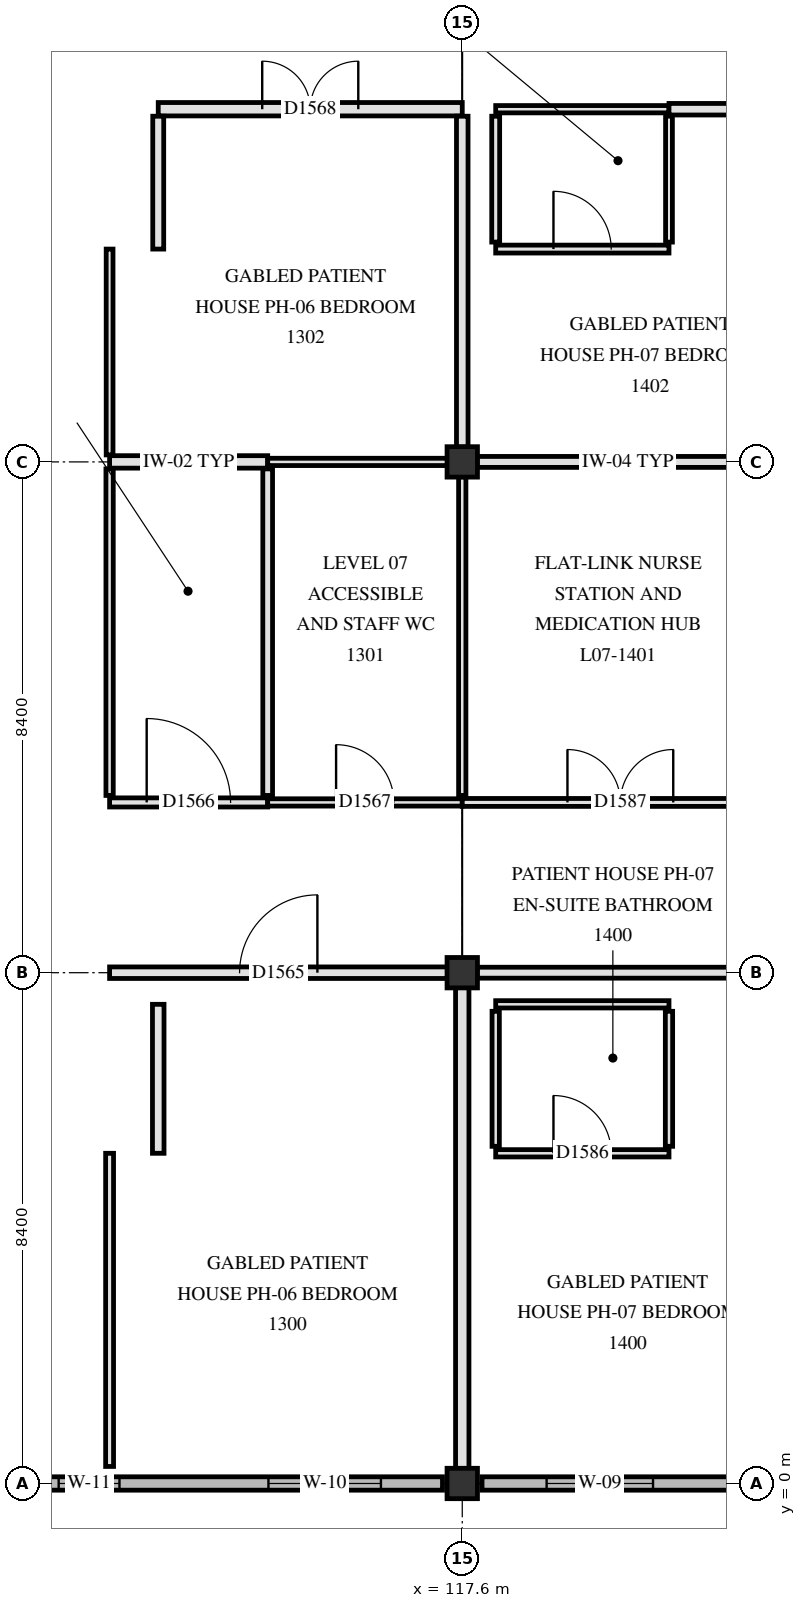
"""IFC4 building model, lengths in metres.
Left out: names, types, materials, properties, quantities, classifications, styles, units other than length and angle.
Written with IfcOpenShell. Run it as: python <this file> out.ifc"""

import sys

from ifc_helpers import new_model, si_unit, direction, frame, frame_2d, origin, origin_2d, place, context, subcontext, project, spatial, polyline, rectangle, outline, extrude, element, fill, save


model = new_model("IFC4")
c1 = context("Model", 3, precision=1e-05, world=origin(), true_north=direction((0.0, 1.0)))
c2 = subcontext(c1, "Body", "Model", "MODEL_VIEW")
j1 = project(units=[si_unit("LENGTHUNIT", "METRE"), si_unit("PLANEANGLEUNIT", "RADIAN")], contexts=[c1])
p1 = place(None, origin())
s1 = spatial("IfcSite", under=j1, at=p1, CompositionType="ELEMENT")
p2 = place(p1, origin())
s2 = spatial("IfcBuilding", under=s1, at=p2, CompositionType="ELEMENT")
p3 = place(p2, frame((0.0, 0.0, 30.3)))
s3 = spatial("IfcBuildingStorey", under=s2, at=p3, CompositionType="ELEMENT", Elevation=30.3)
for number, where, z_axis, x_axis in (
    (1, (117.6, 0.0, 0.0), (0.0, 0.0, 1.0), (1.0, 0.0, 0.0)),
    (2, (117.6, 8.4, 0.0), (0.0, 0.0, 1.0), (1.0, 0.0, 0.0)),
    (3, (117.6, 16.8, 0.0), (0.0, 0.0, 1.0), (1.0, 0.0, 0.0)),
):
    element("IfcColumn", number, at=place(p3, frame(where, z_axis=z_axis, x_axis=x_axis)), inside=s3, PredefinedType="COLUMN", context=c2, shape_type="SweptSolid", body=[
        extrude(rectangle(XDim=0.5, YDim=0.5, at=origin_2d()), origin(), (0.0, 0.0, 1.0), 3.9),
    ])
p4 = place(p3, frame((125.675, 0.0, 0.0), z_axis=(0.0, 0.0, 1.0), x_axis=(-1.0, 0.0, 0.0)))
e4 = element("IfcWall", 4, at=p4, inside=s3, PredefinedType="SOLIDWALL", context=c2, shape_type="SweptSolid", body=[
    extrude(outline(polyline([(0.0, 0.0), (7.75, 0.0), (7.75, 3.4), (3.875, 5.76), (0.0, 3.4), (0.0, 0.0)])), frame((0.0, 0.11, 0.0), z_axis=(0.0, -1.0, 0.0), x_axis=(1.0, 0.0, 0.0)), (0.0, 0.0, 1.0), 0.22),
])
p5 = place(p4, frame((1.113, 0.0, 0.85)))
e5 = element("IfcOpeningElement", 5, at=p5, cuts=e4, PredefinedType="OPENING", context=c2, shape_type="SweptSolid", body=[
    extrude(rectangle(XDim=1.65, YDim=1.3, at=frame_2d((0.825, 0.65))), frame((0.0, 0.12, 0.0), z_axis=(0.0, -1.0, 0.0), x_axis=(1.0, 0.0, 0.0)), (0.0, 0.0, 1.0), 0.24),
])
p6 = place(p4, frame((4.938, 0.0, 0.85)))
e6 = element("IfcOpeningElement", 6, at=p6, cuts=e4, PredefinedType="OPENING", context=c2, shape_type="SweptSolid", body=[
    extrude(rectangle(XDim=1.75, YDim=1.3, at=frame_2d((0.875, 0.65))), frame((0.0, 0.12, 0.0), z_axis=(0.0, -1.0, 0.0), x_axis=(1.0, 0.0, 0.0)), (0.0, 0.0, 1.0), 0.24),
])
p7 = place(p3, frame((117.275, 0.0, 0.0), z_axis=(0.0, 0.0, 1.0), x_axis=(-1.0, 0.0, 0.0)))
e7 = element("IfcWall", 7, at=p7, inside=s3, PredefinedType="SOLIDWALL", context=c2, shape_type="SweptSolid", body=[
    extrude(outline(polyline([(0.0, 0.0), (7.75, 0.0), (7.75, 3.4), (3.875, 5.76), (0.0, 3.4), (0.0, 0.0)])), frame((0.0, 0.11, 0.0), z_axis=(0.0, -1.0, 0.0), x_axis=(1.0, 0.0, 0.0)), (0.0, 0.0, 1.0), 0.22),
])
p8 = place(p7, frame((1.012, 0.0, 0.85)))
e8 = element("IfcOpeningElement", 8, at=p8, cuts=e7, PredefinedType="OPENING", context=c2, shape_type="SweptSolid", body=[
    extrude(rectangle(XDim=1.85, YDim=1.3, at=frame_2d((0.925, 0.65))), frame((0.0, 0.12, 0.0), z_axis=(0.0, -1.0, 0.0), x_axis=(1.0, 0.0, 0.0)), (0.0, 0.0, 1.0), 0.24),
])
p9 = place(p7, frame((5.312, 0.0, 0.85)))
e9 = element("IfcOpeningElement", 9, at=p9, cuts=e7, PredefinedType="OPENING", context=c2, shape_type="SweptSolid", body=[
    extrude(rectangle(XDim=1.0, YDim=1.42, at=frame_2d((0.5, 0.71))), frame((0.0, 0.12, 0.0), z_axis=(0.0, -1.0, 0.0), x_axis=(1.0, 0.0, 0.0)), (0.0, 0.0, 1.0), 0.24),
])
p10 = place(p3, frame((118.15, 5.43, 0.0), z_axis=(0.0, 0.0, 1.0), x_axis=(1.0, 0.0, 0.0)))
e10 = element("IfcWall", 10, at=p10, inside=s3, PredefinedType="PARTITIONING", context=c2, shape_type="SweptSolid", body=[
    extrude(rectangle(XDim=2.85, YDim=0.12, at=frame_2d((1.425, 0.0))), origin(), (0.0, 0.0, 1.0), 3.65),
])
p11 = place(p10, frame((0.95, 0.0, 0.0)))
e11 = element("IfcOpeningElement", 11, at=p11, cuts=e10, PredefinedType="OPENING", context=c2, shape_type="SweptSolid", body=[
    extrude(rectangle(XDim=0.95, YDim=2.1, at=frame_2d((0.475, 1.05))), frame((0.0, 0.07, 0.0), z_axis=(0.0, -1.0, 0.0), x_axis=(1.0, 0.0, 0.0)), (0.0, 0.0, 1.0), 0.14),
])
p12 = place(p3, frame((118.15, 7.88, 0.0), z_axis=(0.0, 0.0, 1.0), x_axis=(1.0, 0.0, 0.0)))
e12 = element("IfcWall", 12, at=p12, inside=s3, PredefinedType="PARTITIONING", context=c2, shape_type="SweptSolid", body=[
    extrude(rectangle(XDim=2.85, YDim=0.12, at=frame_2d((1.425, 0.0))), origin(), (0.0, 0.0, 1.0), 3.65),
])
p13 = place(p3, frame((111.8, 8.4, 0.0), z_axis=(0.0, 0.0, 1.0), x_axis=(1.0, 0.0, 0.0)))
e13 = element("IfcWall", 13, at=p13, inside=s3, PredefinedType="PARTITIONING", context=c2, shape_type="SweptSolid", body=[
    extrude(rectangle(XDim=5.555, YDim=0.19, at=frame_2d((2.777, 0.0))), origin(), (0.0, 0.0, 1.0), 3.25),
])
p14 = place(p13, frame((2.137, 0.0, 0.0)))
e14 = element("IfcOpeningElement", 14, at=p14, cuts=e13, PredefinedType="OPENING", context=c2, shape_type="SweptSolid", body=[
    extrude(rectangle(XDim=1.28, YDim=2.18, at=frame_2d((0.64, 1.09))), frame((0.0, 0.105, 0.0), z_axis=(0.0, -1.0, 0.0), x_axis=(1.0, 0.0, 0.0)), (0.0, 0.0, 1.0), 0.21),
])
p15 = place(p3, frame((117.845, 8.4, 0.0), z_axis=(0.0, 0.0, 1.0), x_axis=(1.0, 0.0, 0.0)))
e15 = element("IfcWall", 15, at=p15, inside=s3, PredefinedType="PARTITIONING", context=c2, shape_type="SweptSolid", body=[
    extrude(rectangle(XDim=7.91, YDim=0.18, at=frame_2d((3.955, 0.0))), origin(), (0.0, 0.0, 1.0), 3.25),
])
p16 = place(p15, frame((4.335, 0.0, 0.0)))
e16 = element("IfcOpeningElement", 16, at=p16, cuts=e15, PredefinedType="OPENING", context=c2, shape_type="SweptSolid", body=[
    extrude(rectangle(XDim=1.54, YDim=2.24, at=frame_2d((0.77, 1.12))), frame((0.0, 0.1, 0.0), z_axis=(0.0, -1.0, 0.0), x_axis=(1.0, 0.0, 0.0)), (0.0, 0.0, 1.0), 0.2),
])
p17 = place(p3, frame((111.8, 11.2, 0.0), z_axis=(0.0, 0.0, 1.0), x_axis=(1.0, 0.0, 0.0)))
e17 = element("IfcWall", 17, at=p17, inside=s3, PredefinedType="PARTITIONING", context=c2, shape_type="SweptSolid", body=[
    extrude(rectangle(XDim=2.6, YDim=0.15, at=frame_2d((1.3, 0.0))), origin(), (0.0, 0.0, 1.0), 3.41),
])
p18 = place(p17, frame((0.61, 0.0, 0.0)))
e18 = element("IfcOpeningElement", 18, at=p18, cuts=e17, PredefinedType="OPENING", context=c2, shape_type="SweptSolid", body=[
    extrude(rectangle(XDim=1.38, YDim=2.22, at=frame_2d((0.69, 1.11))), frame((0.0, 0.085, 0.0), z_axis=(0.0, -1.0, 0.0), x_axis=(1.0, 0.0, 0.0)), (0.0, 0.0, 1.0), 0.17),
])
p19 = place(p3, frame((114.4, 11.2, 0.0), z_axis=(0.0, 0.0, 1.0), x_axis=(1.0, 0.0, 0.0)))
e19 = element("IfcWall", 19, at=p19, inside=s3, PredefinedType="PARTITIONING", context=c2, shape_type="SweptSolid", body=[
    extrude(rectangle(XDim=3.2, YDim=0.12, at=frame_2d((1.6, 0.0))), origin(), (0.0, 0.0, 1.0), 3.25),
])
p20 = place(p19, frame((1.125, 0.0, 0.0)))
e20 = element("IfcOpeningElement", 20, at=p20, cuts=e19, PredefinedType="OPENING", context=c2, shape_type="SweptSolid", body=[
    extrude(rectangle(XDim=0.95, YDim=2.1, at=frame_2d((0.475, 1.05))), frame((0.0, 0.07, 0.0), z_axis=(0.0, -1.0, 0.0), x_axis=(1.0, 0.0, 0.0)), (0.0, 0.0, 1.0), 0.14),
])
p21 = place(p3, frame((117.6, 11.2, 0.0), z_axis=(0.0, 0.0, 1.0), x_axis=(1.0, 0.0, 0.0)))
e21 = element("IfcWall", 21, at=p21, inside=s3, PredefinedType="PARTITIONING", context=c2, shape_type="SweptSolid", body=[
    extrude(rectangle(XDim=5.2, YDim=0.13, at=frame_2d((2.6, 0.0))), origin(), (0.0, 0.0, 1.0), 3.25),
])
p22 = place(p21, frame((1.73, 0.0, 0.0)))
e22 = element("IfcOpeningElement", 22, at=p22, cuts=e21, PredefinedType="OPENING", context=c2, shape_type="SweptSolid", body=[
    extrude(rectangle(XDim=1.74, YDim=2.24, at=frame_2d((0.87, 1.12))), frame((0.0, 0.075, 0.0), z_axis=(0.0, -1.0, 0.0), x_axis=(1.0, 0.0, 0.0)), (0.0, 0.0, 1.0), 0.15),
])
p23 = place(p3, frame((111.8, 16.8, 0.0), z_axis=(0.0, 0.0, 1.0), x_axis=(1.0, 0.0, 0.0)))
e23 = element("IfcWall", 23, at=p23, inside=s3, PredefinedType="PARTITIONING", context=c2, shape_type="SweptSolid", body=[
    extrude(rectangle(XDim=2.6, YDim=0.205, at=frame_2d((1.3, 0.0))), origin(), (0.0, 0.0, 1.0), 3.25),
])
p24 = place(p3, frame((114.4, 16.8, 0.0), z_axis=(0.0, 0.0, 1.0), x_axis=(1.0, 0.0, 0.0)))
e24 = element("IfcWall", 24, at=p24, inside=s3, PredefinedType="PARTITIONING", context=c2, shape_type="SweptSolid", body=[
    extrude(rectangle(XDim=2.955, YDim=0.12, at=frame_2d((1.478, 0.0))), origin(), (0.0, 0.0, 1.0), 3.25),
])
p25 = place(p3, frame((117.845, 16.8, 0.0), z_axis=(0.0, 0.0, 1.0), x_axis=(1.0, 0.0, 0.0)))
e25 = element("IfcWall", 25, at=p25, inside=s3, PredefinedType="PARTITIONING", context=c2, shape_type="SweptSolid", body=[
    extrude(rectangle(XDim=4.955, YDim=0.18, at=frame_2d((2.478, 0.0))), origin(), (0.0, 0.0, 1.0), 3.25),
])
p26 = place(p3, frame((118.15, 20.3, 0.0), z_axis=(0.0, 0.0, 1.0), x_axis=(1.0, 0.0, 0.0)))
e26 = element("IfcWall", 26, at=p26, inside=s3, PredefinedType="PARTITIONING", context=c2, shape_type="SweptSolid", body=[
    extrude(rectangle(XDim=2.85, YDim=0.13, at=frame_2d((1.425, 0.0))), origin(), (0.0, 0.0, 1.0), 3.65),
])
p27 = place(p26, frame((0.95, 0.0, 0.0)))
e27 = element("IfcOpeningElement", 27, at=p27, cuts=e26, PredefinedType="OPENING", context=c2, shape_type="SweptSolid", body=[
    extrude(rectangle(XDim=0.95, YDim=2.1, at=frame_2d((0.475, 1.05))), frame((0.0, 0.075, 0.0), z_axis=(0.0, -1.0, 0.0), x_axis=(1.0, 0.0, 0.0)), (0.0, 0.0, 1.0), 0.15),
])
p28 = place(p3, frame((112.6, 22.6, 0.0), z_axis=(0.0, 0.0, 1.0), x_axis=(1.0, 0.0, 0.0)))
e28 = element("IfcWall", 28, at=p28, inside=s3, PredefinedType="PARTITIONING", context=c2, shape_type="SweptSolid", body=[
    extrude(rectangle(XDim=5.0, YDim=0.22, at=frame_2d((2.5, 0.0))), origin(), (0.0, 0.0, 1.0), 3.25),
])
p29 = place(p28, frame((1.71, 0.0, 0.0)))
e29 = element("IfcOpeningElement", 29, at=p29, cuts=e28, PredefinedType="OPENING", context=c2, shape_type="SweptSolid", body=[
    extrude(rectangle(XDim=1.58, YDim=2.22, at=frame_2d((0.79, 1.11))), frame((0.0, 0.12, 0.0), z_axis=(0.0, -1.0, 0.0), x_axis=(1.0, 0.0, 0.0)), (0.0, 0.0, 1.0), 0.24),
])
p30 = place(p3, frame((118.15, 22.6, 0.0), z_axis=(0.0, 0.0, 1.0), x_axis=(1.0, 0.0, 0.0)))
e30 = element("IfcWall", 30, at=p30, inside=s3, PredefinedType="PARTITIONING", context=c2, shape_type="SweptSolid", body=[
    extrude(rectangle(XDim=2.85, YDim=0.12, at=frame_2d((1.425, 0.0))), origin(), (0.0, 0.0, 1.0), 3.65),
])
p31 = place(p3, frame((121.0, 22.6, 0.0), z_axis=(0.0, 0.0, 1.0), x_axis=(1.0, 0.0, 0.0)))
e31 = element("IfcWall", 31, at=p31, inside=s3, PredefinedType="PARTITIONING", context=c2, shape_type="SweptSolid", body=[
    extrude(rectangle(XDim=5.0, YDim=0.19, at=frame_2d((2.5, 0.0))), origin(), (0.0, 0.0, 1.0), 3.25),
])
p32 = place(p31, frame((1.99, 0.0, 0.0)))
e32 = element("IfcOpeningElement", 32, at=p32, cuts=e31, PredefinedType="OPENING", context=c2, shape_type="SweptSolid", body=[
    extrude(rectangle(XDim=1.02, YDim=2.12, at=frame_2d((0.51, 1.06))), frame((0.0, 0.105, 0.0), z_axis=(0.0, -1.0, 0.0), x_axis=(1.0, 0.0, 0.0)), (0.0, 0.0, 1.0), 0.21),
])
p33 = place(p3, frame((111.8, 0.28, 0.0), z_axis=(0.0, 0.0, 1.0), x_axis=(0.0, 1.0, 0.0)))
e33 = element("IfcWall", 33, at=p33, inside=s3, PredefinedType="PARTITIONING", context=c2, shape_type="SweptSolid", body=[
    extrude(rectangle(XDim=5.15, YDim=0.13, at=frame_2d((2.575, 0.0))), origin(), (0.0, 0.0, 1.0), 3.41),
])
p34 = place(p3, frame((111.8, 11.315, 0.0), z_axis=(0.0, 0.0, 1.0), x_axis=(0.0, 1.0, 0.0)))
e34 = element("IfcWall", 34, at=p34, inside=s3, PredefinedType="PARTITIONING", context=c2, shape_type="SweptSolid", body=[
    extrude(rectangle(XDim=5.37, YDim=0.12, at=frame_2d((2.685, 0.0))), origin(), (0.0, 0.0, 1.0), 3.41),
])
p35 = place(p3, frame((111.8, 16.915, 0.0), z_axis=(0.0, 0.0, 1.0), x_axis=(0.0, 1.0, 0.0)))
e35 = element("IfcWall", 35, at=p35, inside=s3, PredefinedType="PARTITIONING", context=c2, shape_type="SweptSolid", body=[
    extrude(rectangle(XDim=3.385, YDim=0.112, at=frame_2d((1.692, 0.0))), origin(), (0.0, 0.0, 1.0), 3.41),
])
p36 = place(p3, frame((112.6, 5.43, 0.0), z_axis=(0.0, 0.0, 1.0), x_axis=(0.0, 1.0, 0.0)))
e36 = element("IfcWall", 36, at=p36, inside=s3, PredefinedType="PARTITIONING", context=c2, shape_type="SweptSolid", body=[
    extrude(rectangle(XDim=2.45, YDim=0.19, at=frame_2d((1.225, 0.0))), origin(), (0.0, 0.0, 1.0), 3.41),
])
p37 = place(p3, frame((112.6, 20.3, 0.0), z_axis=(0.0, 0.0, 1.0), x_axis=(0.0, 1.0, 0.0)))
e37 = element("IfcWall", 37, at=p37, inside=s3, PredefinedType="PARTITIONING", context=c2, shape_type="SweptSolid", body=[
    extrude(rectangle(XDim=2.185, YDim=0.18, at=frame_2d((1.093, 0.0))), origin(), (0.0, 0.0, 1.0), 3.41),
])
p38 = place(p3, frame((114.4, 11.315, 0.0), z_axis=(0.0, 0.0, 1.0), x_axis=(0.0, 1.0, 0.0)))
e38 = element("IfcWall", 38, at=p38, inside=s3, PredefinedType="PARTITIONING", context=c2, shape_type="SweptSolid", body=[
    extrude(rectangle(XDim=5.37, YDim=0.16, at=frame_2d((2.685, 0.0))), origin(), (0.0, 0.0, 1.0), 3.41),
])
p39 = place(p3, frame((117.6, 0.245, 0.0), z_axis=(0.0, 0.0, 1.0), x_axis=(0.0, 1.0, 0.0)))
e39 = element("IfcWall", 39, at=p39, inside=s3, PredefinedType="PARTITIONING", context=c2, shape_type="SweptSolid", body=[
    extrude(rectangle(XDim=7.91, YDim=0.22, at=frame_2d((3.955, 0.0))), origin(), (0.0, 0.0, 1.0), 3.25),
])
p40 = place(p3, frame((117.6, 11.315, 0.0), z_axis=(0.0, 0.0, 1.0), x_axis=(0.0, 1.0, 0.0)))
e40 = element("IfcWall", 40, at=p40, inside=s3, PredefinedType="PARTITIONING", context=c2, shape_type="SweptSolid", body=[
    extrude(rectangle(XDim=5.24, YDim=0.12, at=frame_2d((2.62, 0.0))), origin(), (0.0, 0.0, 1.0), 3.25),
])
p41 = place(p3, frame((117.6, 17.045, 0.0), z_axis=(0.0, 0.0, 1.0), x_axis=(0.0, 1.0, 0.0)))
e41 = element("IfcWall", 41, at=p41, inside=s3, PredefinedType="PARTITIONING", context=c2, shape_type="SweptSolid", body=[
    extrude(rectangle(XDim=5.44, YDim=0.19, at=frame_2d((2.72, 0.0))), origin(), (0.0, 0.0, 1.0), 3.25),
])
p42 = place(p3, frame((118.15, 5.545, 0.0), z_axis=(0.0, 0.0, 1.0), x_axis=(0.0, 1.0, 0.0)))
e42 = element("IfcWall", 42, at=p42, inside=s3, PredefinedType="PARTITIONING", context=c2, shape_type="SweptSolid", body=[
    extrude(rectangle(XDim=2.22, YDim=0.12, at=frame_2d((1.11, 0.0))), origin(), (0.0, 0.0, 1.0), 3.41),
])
p43 = place(p3, frame((118.15, 20.415, 0.0), z_axis=(0.0, 0.0, 1.0), x_axis=(0.0, 1.0, 0.0)))
e43 = element("IfcWall", 43, at=p43, inside=s3, PredefinedType="PARTITIONING", context=c2, shape_type="SweptSolid", body=[
    extrude(rectangle(XDim=2.07, YDim=0.13, at=frame_2d((1.035, 0.0))), origin(), (0.0, 0.0, 1.0), 3.41),
])
p44 = place(p3, frame((121.0, 5.545, 0.0), z_axis=(0.0, 0.0, 1.0), x_axis=(0.0, 1.0, 0.0)))
e44 = element("IfcWall", 44, at=p44, inside=s3, PredefinedType="PARTITIONING", context=c2, shape_type="SweptSolid", body=[
    extrude(rectangle(XDim=2.22, YDim=0.12, at=frame_2d((1.11, 0.0))), origin(), (0.0, 0.0, 1.0), 3.41),
])
p45 = place(p3, frame((121.0, 20.415, 0.0), z_axis=(0.0, 0.0, 1.0), x_axis=(0.0, 1.0, 0.0)))
e45 = element("IfcWall", 45, at=p45, inside=s3, PredefinedType="PARTITIONING", context=c2, shape_type="SweptSolid", body=[
    extrude(rectangle(XDim=2.07, YDim=0.112, at=frame_2d((1.035, 0.0))), origin(), (0.0, 0.0, 1.0), 3.41),
])
p46 = place(p6, origin())
e46 = element("IfcWindow", 46, at=p46, inside=s3, PartitioningType="SINGLE_PANEL", PredefinedType="WINDOW", context=c2, shape_type="SweptSolid", body=[
    extrude(rectangle(XDim=1.75, YDim=1.3, at=frame_2d((0.875, 0.65))), frame((0.0, 0.03, 0.0), z_axis=(0.0, -1.0, 0.0), x_axis=(1.0, 0.0, 0.0)), (0.0, 0.0, 1.0), 0.06),
])
fill(e6, e46)
p47 = place(p8, origin())
e47 = element("IfcWindow", 47, at=p47, inside=s3, PartitioningType="SINGLE_PANEL", PredefinedType="WINDOW", context=c2, shape_type="SweptSolid", body=[
    extrude(rectangle(XDim=1.85, YDim=1.3, at=frame_2d((0.925, 0.65))), frame((0.0, 0.03, 0.0), z_axis=(0.0, -1.0, 0.0), x_axis=(1.0, 0.0, 0.0)), (0.0, 0.0, 1.0), 0.06),
])
fill(e8, e47)
p48 = place(p9, origin())
e48 = element("IfcWindow", 48, at=p48, inside=s3, PartitioningType="SINGLE_PANEL", PredefinedType="WINDOW", context=c2, shape_type="SweptSolid", body=[
    extrude(rectangle(XDim=1.0, YDim=1.42, at=frame_2d((0.5, 0.71))), frame((0.0, 0.03, 0.0), z_axis=(0.0, -1.0, 0.0), x_axis=(1.0, 0.0, 0.0)), (0.0, 0.0, 1.0), 0.06),
])
fill(e9, e48)
p49 = place(p14, origin())
e49 = element("IfcDoor", 49, at=p49, inside=s3, OperationType="SINGLE_SWING_RIGHT", PredefinedType="DOOR", context=c2, shape_type="SweptSolid", body=[
    extrude(rectangle(XDim=1.28, YDim=2.18, at=frame_2d((0.64, 1.09))), frame((0.0, 0.025, 0.0), z_axis=(0.0, -1.0, 0.0), x_axis=(1.0, 0.0, 0.0)), (0.0, 0.0, 1.0), 0.05),
])
fill(e14, e49)
p50 = place(p18, origin())
e50 = element("IfcDoor", 50, at=p50, inside=s3, OperationType="SINGLE_SWING_LEFT", PredefinedType="DOOR", context=c2, shape_type="SweptSolid", body=[
    extrude(rectangle(XDim=1.38, YDim=2.22, at=frame_2d((0.69, 1.11))), frame((0.0, 0.025, 0.0), z_axis=(0.0, -1.0, 0.0), x_axis=(1.0, 0.0, 0.0)), (0.0, 0.0, 1.0), 0.05),
])
fill(e18, e50)
p51 = place(p20, origin())
e51 = element("IfcDoor", 51, at=p51, inside=s3, OperationType="SINGLE_SWING_LEFT", PredefinedType="DOOR", context=c2, shape_type="SweptSolid", body=[
    extrude(rectangle(XDim=0.95, YDim=2.1, at=frame_2d((0.475, 1.05))), frame((0.0, 0.025, 0.0), z_axis=(0.0, -1.0, 0.0), x_axis=(1.0, 0.0, 0.0)), (0.0, 0.0, 1.0), 0.05),
])
fill(e20, e51)
p52 = place(p29, origin())
e52 = element("IfcDoor", 52, at=p52, inside=s3, OperationType="DOUBLE_SWING_LEFT", PredefinedType="DOOR", context=c2, shape_type="SweptSolid", body=[
    extrude(rectangle(XDim=1.58, YDim=2.22, at=frame_2d((0.79, 1.11))), frame((0.0, 0.025, 0.0), z_axis=(0.0, -1.0, 0.0), x_axis=(1.0, 0.0, 0.0)), (0.0, 0.0, 1.0), 0.05),
])
fill(e29, e52)
p53 = place(p11, origin())
e53 = element("IfcDoor", 53, at=p53, inside=s3, OperationType="SINGLE_SWING_LEFT", PredefinedType="DOOR", context=c2, shape_type="SweptSolid", body=[
    extrude(rectangle(XDim=0.95, YDim=2.1, at=frame_2d((0.475, 1.05))), frame((0.0, 0.025, 0.0), z_axis=(0.0, -1.0, 0.0), x_axis=(1.0, 0.0, 0.0)), (0.0, 0.0, 1.0), 0.05),
])
fill(e11, e53)
p54 = place(p22, origin())
e54 = element("IfcDoor", 54, at=p54, inside=s3, OperationType="DOUBLE_SWING_RIGHT", PredefinedType="DOOR", context=c2, shape_type="SweptSolid", body=[
    extrude(rectangle(XDim=1.74, YDim=2.24, at=frame_2d((0.87, 1.12))), frame((0.0, 0.025, 0.0), z_axis=(0.0, -1.0, 0.0), x_axis=(1.0, 0.0, 0.0)), (0.0, 0.0, 1.0), 0.05),
])
fill(e22, e54)
p55 = place(p27, origin())
e55 = element("IfcDoor", 55, at=p55, inside=s3, OperationType="SINGLE_SWING_LEFT", PredefinedType="DOOR", context=c2, shape_type="SweptSolid", body=[
    extrude(rectangle(XDim=0.95, YDim=2.1, at=frame_2d((0.475, 1.05))), frame((0.0, 0.025, 0.0), z_axis=(0.0, -1.0, 0.0), x_axis=(1.0, 0.0, 0.0)), (0.0, 0.0, 1.0), 0.05),
])
fill(e27, e55)
save(model, sys.argv[1])
